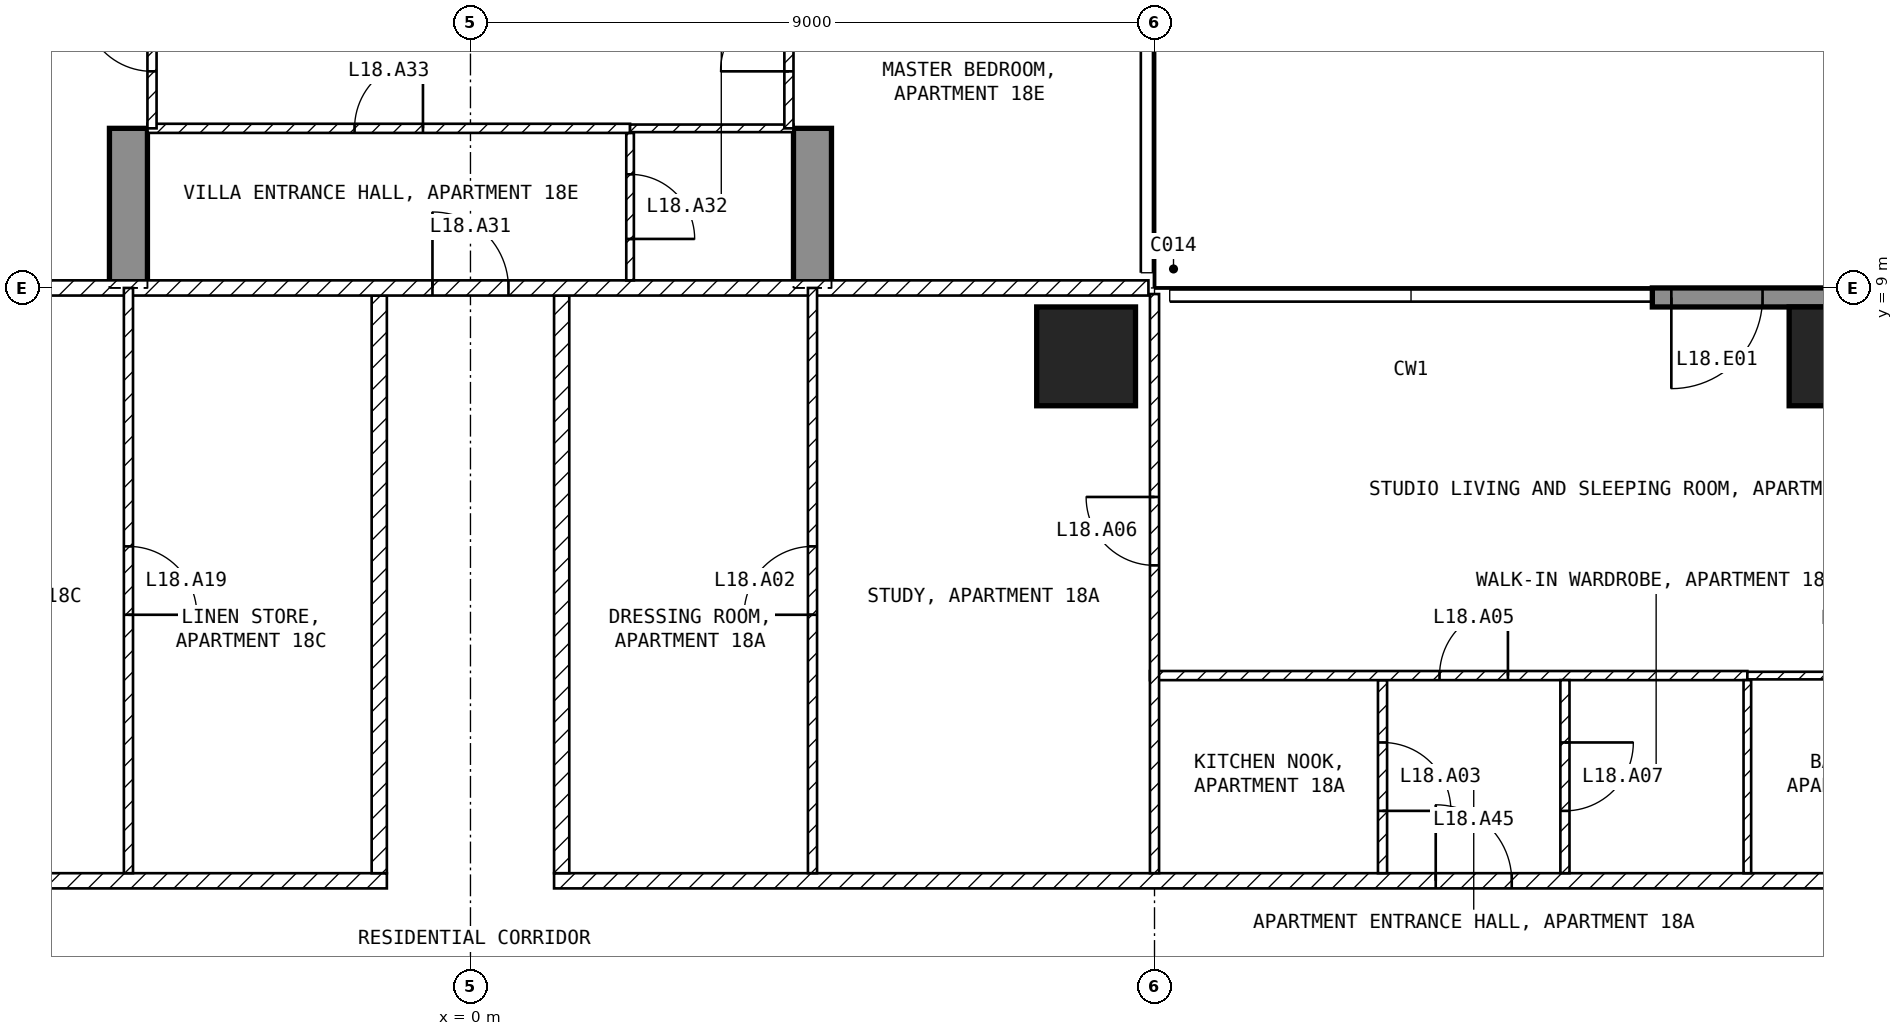
"""IFC4 building model, lengths in metres.
Left out: names, types, materials, properties, quantities, classifications, styles, units other than length and angle.
Written with IfcOpenShell. Run it as: python <this file> out.ifc"""

import sys

from ifc_helpers import new_model, si_unit, direction, frame, frame_2d, origin, origin_2d, place, context, subcontext, project, spatial, polyline, rectangle, outline, extrude, element, fill, save


model = new_model("IFC4")
c1 = context("Model", 3, precision=1e-05, world=origin(), true_north=direction((0.0, 1.0)))
c2 = subcontext(c1, "Body", "Model", "MODEL_VIEW")
j1 = project(units=[si_unit("LENGTHUNIT", "METRE"), si_unit("PLANEANGLEUNIT", "RADIAN")], contexts=[c1])
p1 = place(None, origin())
s1 = spatial("IfcSite", under=j1, at=p1, CompositionType="ELEMENT")
p2 = place(p1, origin())
s2 = spatial("IfcBuilding", under=s1, at=p2, CompositionType="ELEMENT")
p3 = place(p2, frame((0.0, 0.0, 82.0)))
s3 = spatial("IfcBuildingStorey", under=s2, at=p3, CompositionType="ELEMENT", Elevation=82.0)
for number, where, z_axis, x_axis in (
    (1, (8.1, 8.1, -0.25), (0.0, 0.0, 1.0), (1.0, 0.0, 0.0)),
    (2, (18.0, 8.1, -0.25), (0.0, 0.0, 1.0), (1.0, 0.0, 0.0)),
):
    element("IfcColumn", number, at=place(p3, frame(where, z_axis=z_axis, x_axis=x_axis)), inside=s3, PredefinedType="COLUMN", context=c2, shape_type="SweptSolid", body=[
        extrude(rectangle(XDim=1.3, YDim=1.3, at=origin_2d()), origin(), (0.0, 0.0, 1.0), 3.5),
    ])
for number, where, z_axis, x_axis in (
    (3, (-4.75, 9.0, -0.25), (1.0, 0.0, 0.0), (0.0, 1.0, 0.0)),
    (4, (4.25, 9.0, -0.25), (1.0, 0.0, 0.0), (0.0, 1.0, 0.0)),
):
    element("IfcWall", number, at=place(p3, frame(where, z_axis=z_axis, x_axis=x_axis)), inside=s3, PredefinedType="SHEAR", context=c2, shape_type="SweptSolid", body=[
        extrude(outline(polyline([(0.0, 0.0), (2.1, 0.0), (2.1, 2.65), (4.5, 2.65), (4.5, 0.0), (9.9, 0.0), (9.9, 2.65), (12.3, 2.65), (12.3, 0.0), (16.45, 0.0), (16.45, 3.5), (0.0, 3.5), (0.0, 0.0)])), origin(), (0.0, 0.0, 1.0), 0.5),
    ])
p4 = place(p3, frame((18.2, 8.875, 0.0), z_axis=(0.0, 0.0, 1.0), x_axis=(-1.0, 0.0, 0.0)))
e5 = element("IfcWall", 5, at=p4, inside=s3, PredefinedType="SOLIDWALL", context=c2, shape_type="SweptSolid", body=[
    extrude(rectangle(XDim=2.65, YDim=0.25, at=frame_2d((1.325, 0.0))), origin(), (0.0, 0.0, 1.0), 3.25),
])
p5 = place(p4, frame((1.2, 0.0, 0.0)))
e6 = element("IfcOpeningElement", 6, at=p5, cuts=e5, PredefinedType="OPENING", context=c2, shape_type="SweptSolid", body=[
    extrude(rectangle(XDim=1.2, YDim=2.4, at=frame_2d((0.6, 1.2))), frame((0.0, 0.135, 0.0), z_axis=(0.0, -1.0, 0.0), x_axis=(1.0, 0.0, 0.0)), (0.0, 0.0, 1.0), 0.27),
])
p6 = place(p3, frame((1.1, 1.2, 0.0), z_axis=(0.0, 0.0, 1.0), x_axis=(1.0, 0.0, 0.0)))
e7 = element("IfcWall", 7, at=p6, inside=s3, PredefinedType="PARTITIONING", context=c2, shape_type="SweptSolid", body=[
    extrude(rectangle(XDim=20.5, YDim=0.2, at=frame_2d((10.25, 0.0))), origin(), (0.0, 0.0, 1.0), 3.25),
])
p7 = place(p6, frame((11.6, 0.0, 0.0)))
e8 = element("IfcOpeningElement", 8, at=p7, cuts=e7, PredefinedType="OPENING", context=c2, shape_type="SweptSolid", body=[
    extrude(rectangle(XDim=1.0, YDim=2.1, at=frame_2d((0.5, 1.05))), frame((0.0, 0.11, 0.0), z_axis=(0.0, -1.0, 0.0), x_axis=(1.0, 0.0, 0.0)), (0.0, 0.0, 1.0), 0.22),
])
p8 = place(p3, frame((1.2, 8.9, 0.0), z_axis=(0.0, 0.0, 1.0), x_axis=(0.0, -1.0, 0.0)))
e9 = element("IfcWall", 9, at=p8, inside=s3, PredefinedType="PARTITIONING", context=c2, shape_type="SweptSolid", body=[
    extrude(rectangle(XDim=7.6, YDim=0.2, at=frame_2d((3.8, 0.0))), origin(), (0.0, 0.0, 1.0), 3.25),
])
p9 = place(p3, frame((-21.6, 1.2, 0.0), z_axis=(0.0, 0.0, 1.0), x_axis=(1.0, 0.0, 0.0)))
e10 = element("IfcWall", 10, at=p9, inside=s3, PredefinedType="PARTITIONING", context=c2, shape_type="SweptSolid", body=[
    extrude(rectangle(XDim=20.5, YDim=0.2, at=frame_2d((10.25, 0.0))), origin(), (0.0, 0.0, 1.0), 3.25),
])
p10 = place(p9, frame((4.75, 0.0, 0.0)))
e11 = element("IfcOpeningElement", 11, at=p10, cuts=e10, PredefinedType="OPENING", context=c2, shape_type="SweptSolid", body=[
    extrude(rectangle(XDim=1.0, YDim=2.1, at=frame_2d((0.5, 1.05))), frame((0.0, 0.11, 0.0), z_axis=(0.0, -1.0, 0.0), x_axis=(1.0, 0.0, 0.0)), (0.0, 0.0, 1.0), 0.22),
])
p11 = place(p3, frame((-1.2, 1.3, 0.0), z_axis=(0.0, 0.0, 1.0), x_axis=(0.0, 1.0, 0.0)))
e12 = element("IfcWall", 12, at=p11, inside=s3, PredefinedType="PARTITIONING", context=c2, shape_type="SweptSolid", body=[
    extrude(rectangle(XDim=7.6, YDim=0.2, at=frame_2d((3.8, 0.0))), origin(), (0.0, 0.0, 1.0), 3.25),
])
p12 = place(p3, frame((-8.92, 9.0, 0.0), z_axis=(0.0, 0.0, 1.0), x_axis=(1.0, 0.0, 0.0)))
e13 = element("IfcWall", 13, at=p12, inside=s3, PredefinedType="PARTITIONING", context=c2, shape_type="SweptSolid", body=[
    extrude(rectangle(XDim=17.84, YDim=0.2, at=frame_2d((8.92, 0.0))), origin(), (0.0, 0.0, 1.0), 3.25),
])
p13 = place(p12, frame((8.42, 0.0, 0.0)))
e14 = element("IfcOpeningElement", 14, at=p13, cuts=e13, PredefinedType="OPENING", context=c2, shape_type="SweptSolid", body=[
    extrude(rectangle(XDim=1.0, YDim=2.1, at=frame_2d((0.5, 1.05))), frame((0.0, 0.11, 0.0), z_axis=(0.0, -1.0, 0.0), x_axis=(1.0, 0.0, 0.0)), (0.0, 0.0, 1.0), 0.22),
])
p14 = place(p3, frame((12.0, 3.84, 0.0), z_axis=(0.0, 0.0, 1.0), x_axis=(0.0, -1.0, 0.0)))
e15 = element("IfcWall", 15, at=p14, inside=s3, PredefinedType="PARTITIONING", context=c2, shape_type="SweptSolid", body=[
    extrude(rectangle(XDim=2.54, YDim=0.12, at=frame_2d((1.27, 0.0))), origin(), (0.0, 0.0, 1.0), 3.25),
])
p15 = place(p14, frame((0.82, 0.0, 0.0)))
e16 = element("IfcOpeningElement", 16, at=p15, cuts=e15, PredefinedType="OPENING", context=c2, shape_type="SweptSolid", body=[
    extrude(rectangle(XDim=0.9, YDim=2.1, at=frame_2d((0.45, 1.05))), frame((0.0, 0.07, 0.0), z_axis=(0.0, -1.0, 0.0), x_axis=(1.0, 0.0, 0.0)), (0.0, 0.0, 1.0), 0.14),
])
p16 = place(p3, frame((8.94, 3.9, 0.0), z_axis=(0.0, 0.0, 1.0), x_axis=(1.0, 0.0, 0.0)))
e17 = element("IfcWall", 17, at=p16, inside=s3, PredefinedType="PARTITIONING", context=c2, shape_type="SweptSolid", body=[
    extrude(rectangle(XDim=7.86, YDim=0.12, at=frame_2d((3.93, 0.0))), origin(), (0.0, 0.0, 1.0), 3.25),
])
p17 = place(p16, frame((3.81, 0.0, 0.0)))
e18 = element("IfcOpeningElement", 18, at=p17, cuts=e17, PredefinedType="OPENING", context=c2, shape_type="SweptSolid", body=[
    extrude(rectangle(XDim=0.9, YDim=2.1, at=frame_2d((0.45, 1.05))), frame((0.0, 0.07, 0.0), z_axis=(0.0, -1.0, 0.0), x_axis=(1.0, 0.0, 0.0)), (0.0, 0.0, 1.0), 0.14),
])
p18 = place(p3, frame((9.0, 1.3, 0.0), z_axis=(0.0, 0.0, 1.0), x_axis=(0.0, 1.0, 0.0)))
e19 = element("IfcWall", 19, at=p18, inside=s3, PredefinedType="PARTITIONING", context=c2, shape_type="SweptSolid", body=[
    extrude(rectangle(XDim=7.62, YDim=0.12, at=frame_2d((3.81, 0.0))), origin(), (0.0, 0.0, 1.0), 3.25),
])
p19 = place(p18, frame((4.05, 0.0, 0.0)))
e20 = element("IfcOpeningElement", 20, at=p19, cuts=e19, PredefinedType="OPENING", context=c2, shape_type="SweptSolid", body=[
    extrude(rectangle(XDim=0.9, YDim=2.1, at=frame_2d((0.45, 1.05))), frame((0.0, 0.07, 0.0), z_axis=(0.0, -1.0, 0.0), x_axis=(1.0, 0.0, 0.0)), (0.0, 0.0, 1.0), 0.14),
])
p20 = place(p3, frame((14.4, 3.84, 0.0), z_axis=(0.0, 0.0, 1.0), x_axis=(0.0, -1.0, 0.0)))
e21 = element("IfcWall", 21, at=p20, inside=s3, PredefinedType="PARTITIONING", context=c2, shape_type="SweptSolid", body=[
    extrude(rectangle(XDim=2.54, YDim=0.12, at=frame_2d((1.27, 0.0))), origin(), (0.0, 0.0, 1.0), 3.25),
])
p21 = place(p20, frame((0.82, 0.0, 0.0)))
e22 = element("IfcOpeningElement", 22, at=p21, cuts=e21, PredefinedType="OPENING", context=c2, shape_type="SweptSolid", body=[
    extrude(rectangle(XDim=0.9, YDim=2.1, at=frame_2d((0.45, 1.05))), frame((0.0, 0.07, 0.0), z_axis=(0.0, -1.0, 0.0), x_axis=(1.0, 0.0, 0.0)), (0.0, 0.0, 1.0), 0.14),
])
p22 = place(p3, frame((16.8, 3.84, 0.0), z_axis=(0.0, 0.0, 1.0), x_axis=(0.0, -1.0, 0.0)))
e23 = element("IfcWall", 23, at=p22, inside=s3, PredefinedType="PARTITIONING", context=c2, shape_type="SweptSolid", body=[
    extrude(rectangle(XDim=2.54, YDim=0.1, at=frame_2d((1.27, 0.0))), origin(), (0.0, 0.0, 1.0), 3.25),
])
p23 = place(p3, frame((16.8, 3.9, 0.0), z_axis=(0.0, 0.0, 1.0), x_axis=(1.0, 0.0, 0.0)))
e24 = element("IfcWall", 24, at=p23, inside=s3, PredefinedType="PARTITIONING", context=c2, shape_type="SweptSolid", body=[
    extrude(rectangle(XDim=3.0, YDim=0.1, at=frame_2d((1.5, 0.0))), origin(), (0.0, 0.0, 1.0), 3.25),
])
p24 = place(p23, frame((1.075, 0.0, 0.0)))
e25 = element("IfcOpeningElement", 25, at=p24, cuts=e24, PredefinedType="OPENING", context=c2, shape_type="SweptSolid", body=[
    extrude(rectangle(XDim=0.85, YDim=2.1, at=frame_2d((0.425, 1.05))), frame((0.0, 0.06, 0.0), z_axis=(0.0, -1.0, 0.0), x_axis=(1.0, 0.0, 0.0)), (0.0, 0.0, 1.0), 0.12),
])
p25 = place(p3, frame((4.5, 1.3, 0.0), z_axis=(0.0, 0.0, 1.0), x_axis=(0.0, 1.0, 0.0)))
e26 = element("IfcWall", 26, at=p25, inside=s3, PredefinedType="PARTITIONING", context=c2, shape_type="SweptSolid", body=[
    extrude(rectangle(XDim=7.7, YDim=0.12, at=frame_2d((3.85, 0.0))), origin(), (0.0, 0.0, 1.0), 3.25),
])
p26 = place(p25, frame((3.4, 0.0, 0.0)))
e27 = element("IfcOpeningElement", 27, at=p26, cuts=e26, PredefinedType="OPENING", context=c2, shape_type="SweptSolid", body=[
    extrude(rectangle(XDim=0.9, YDim=2.1, at=frame_2d((0.45, 1.05))), frame((0.0, 0.07, 0.0), z_axis=(0.0, -1.0, 0.0), x_axis=(1.0, 0.0, 0.0)), (0.0, 0.0, 1.0), 0.14),
])
p27 = place(p3, frame((-4.5, 9.0, 0.0), z_axis=(0.0, 0.0, 1.0), x_axis=(0.0, -1.0, 0.0)))
e28 = element("IfcWall", 28, at=p27, inside=s3, PredefinedType="PARTITIONING", context=c2, shape_type="SweptSolid", body=[
    extrude(rectangle(XDim=7.7, YDim=0.12, at=frame_2d((3.85, 0.0))), origin(), (0.0, 0.0, 1.0), 3.25),
])
p28 = place(p27, frame((3.4, 0.0, 0.0)))
e29 = element("IfcOpeningElement", 29, at=p28, cuts=e28, PredefinedType="OPENING", context=c2, shape_type="SweptSolid", body=[
    extrude(rectangle(XDim=0.9, YDim=2.1, at=frame_2d((0.45, 1.05))), frame((0.0, 0.07, 0.0), z_axis=(0.0, -1.0, 0.0), x_axis=(1.0, 0.0, 0.0)), (0.0, 0.0, 1.0), 0.14),
])
p29 = place(p3, frame((2.1, 11.04, 0.0), z_axis=(0.0, 0.0, 1.0), x_axis=(0.0, -1.0, 0.0)))
e30 = element("IfcWall", 30, at=p29, inside=s3, PredefinedType="PARTITIONING", context=c2, shape_type="SweptSolid", body=[
    extrude(rectangle(XDim=1.94, YDim=0.1, at=frame_2d((0.97, 0.0))), origin(), (0.0, 0.0, 1.0), 3.25),
])
p30 = place(p29, frame((0.545, 0.0, 0.0)))
e31 = element("IfcOpeningElement", 31, at=p30, cuts=e30, PredefinedType="OPENING", context=c2, shape_type="SweptSolid", body=[
    extrude(rectangle(XDim=0.85, YDim=2.1, at=frame_2d((0.425, 1.05))), frame((0.0, 0.06, 0.0), z_axis=(0.0, -1.0, 0.0), x_axis=(1.0, 0.0, 0.0)), (0.0, 0.0, 1.0), 0.12),
])
p31 = place(p3, frame((-4.25, 11.1, 0.0), z_axis=(0.0, 0.0, 1.0), x_axis=(1.0, 0.0, 0.0)))
e32 = element("IfcWall", 32, at=p31, inside=s3, PredefinedType="PARTITIONING", context=c2, shape_type="SweptSolid", body=[
    extrude(rectangle(XDim=6.35, YDim=0.12, at=frame_2d((3.175, 0.0))), origin(), (0.0, 0.0, 1.0), 3.25),
])
p32 = place(p31, frame((2.725, 0.0, 0.0)))
e33 = element("IfcOpeningElement", 33, at=p32, cuts=e32, PredefinedType="OPENING", context=c2, shape_type="SweptSolid", body=[
    extrude(rectangle(XDim=0.9, YDim=2.1, at=frame_2d((0.45, 1.05))), frame((0.0, 0.07, 0.0), z_axis=(0.0, -1.0, 0.0), x_axis=(1.0, 0.0, 0.0)), (0.0, 0.0, 1.0), 0.14),
])
p33 = place(p3, frame((2.1, 11.1, 0.0), z_axis=(0.0, 0.0, 1.0), x_axis=(1.0, 0.0, 0.0)))
e34 = element("IfcWall", 34, at=p33, inside=s3, PredefinedType="PARTITIONING", context=c2, shape_type="SweptSolid", body=[
    extrude(rectangle(XDim=2.15, YDim=0.1, at=frame_2d((1.075, 0.0))), origin(), (0.0, 0.0, 1.0), 3.25),
])
p34 = place(p3, frame((4.19, 11.1, 0.0), z_axis=(0.0, 0.0, 1.0), x_axis=(0.0, 1.0, 0.0)))
e35 = element("IfcWall", 35, at=p34, inside=s3, PredefinedType="PARTITIONING", context=c2, shape_type="SweptSolid", body=[
    extrude(rectangle(XDim=2.4, YDim=0.12, at=frame_2d((1.2, 0.0))), origin(), (0.0, 0.0, 1.0), 2.4),
])
p35 = place(p34, frame((0.75, 0.0, 0.0)))
e36 = element("IfcOpeningElement", 36, at=p35, cuts=e35, PredefinedType="OPENING", context=c2, shape_type="SweptSolid", body=[
    extrude(rectangle(XDim=0.9, YDim=2.1, at=frame_2d((0.45, 1.05))), frame((0.0, 0.07, 0.0), z_axis=(0.0, -1.0, 0.0), x_axis=(1.0, 0.0, 0.0)), (0.0, 0.0, 1.0), 0.14),
])
p36 = place(p3, frame((-4.19, 11.1, 0.0), z_axis=(0.0, 0.0, 1.0), x_axis=(0.0, 1.0, 0.0)))
e37 = element("IfcWall", 37, at=p36, inside=s3, PredefinedType="PARTITIONING", context=c2, shape_type="SweptSolid", body=[
    extrude(rectangle(XDim=2.4, YDim=0.12, at=frame_2d((1.2, 0.0))), origin(), (0.0, 0.0, 1.0), 2.4),
])
p37 = place(p36, frame((0.75, 0.0, 0.0)))
e38 = element("IfcOpeningElement", 38, at=p37, cuts=e37, PredefinedType="OPENING", context=c2, shape_type="SweptSolid", body=[
    extrude(rectangle(XDim=0.9, YDim=2.1, at=frame_2d((0.45, 1.05))), frame((0.0, 0.07, 0.0), z_axis=(0.0, -1.0, 0.0), x_axis=(1.0, 0.0, 0.0)), (0.0, 0.0, 1.0), 0.14),
])
p38 = place(p5, origin())
e39 = element("IfcDoor", 39, at=p38, inside=s3, OperationType="SINGLE_SWING_RIGHT", PredefinedType="DOOR", context=c2, shape_type="SweptSolid", body=[
    extrude(rectangle(XDim=1.2, YDim=2.4, at=frame_2d((0.6, 1.2))), frame((0.0, 0.025, 0.0), z_axis=(0.0, -1.0, 0.0), x_axis=(1.0, 0.0, 0.0)), (0.0, 0.0, 1.0), 0.05),
])
fill(e6, e39)
p39 = place(p26, origin())
e40 = element("IfcDoor", 40, at=p39, inside=s3, OperationType="SINGLE_SWING_LEFT", PredefinedType="DOOR", context=c2, shape_type="SweptSolid", body=[
    extrude(rectangle(XDim=0.9, YDim=2.1, at=frame_2d((0.45, 1.05))), frame((0.0, 0.025, 0.0), z_axis=(0.0, -1.0, 0.0), x_axis=(1.0, 0.0, 0.0)), (0.0, 0.0, 1.0), 0.05),
])
fill(e27, e40)
p40 = place(p15, origin())
e41 = element("IfcDoor", 41, at=p40, inside=s3, OperationType="SINGLE_SWING_RIGHT", PredefinedType="DOOR", context=c2, shape_type="SweptSolid", body=[
    extrude(rectangle(XDim=0.9, YDim=2.1, at=frame_2d((0.45, 1.05))), frame((0.0, 0.025, 0.0), z_axis=(0.0, -1.0, 0.0), x_axis=(1.0, 0.0, 0.0)), (0.0, 0.0, 1.0), 0.05),
])
fill(e16, e41)
p41 = place(p17, origin())
e42 = element("IfcDoor", 42, at=p41, inside=s3, OperationType="SINGLE_SWING_RIGHT", PredefinedType="DOOR", context=c2, shape_type="SweptSolid", body=[
    extrude(rectangle(XDim=0.9, YDim=2.1, at=frame_2d((0.45, 1.05))), frame((0.0, 0.025, 0.0), z_axis=(0.0, -1.0, 0.0), x_axis=(1.0, 0.0, 0.0)), (0.0, 0.0, 1.0), 0.05),
])
fill(e18, e42)
p42 = place(p19, origin())
e43 = element("IfcDoor", 43, at=p42, inside=s3, OperationType="SINGLE_SWING_RIGHT", PredefinedType="DOOR", context=c2, shape_type="SweptSolid", body=[
    extrude(rectangle(XDim=0.9, YDim=2.1, at=frame_2d((0.45, 1.05))), frame((0.0, 0.025, 0.0), z_axis=(0.0, -1.0, 0.0), x_axis=(1.0, 0.0, 0.0)), (0.0, 0.0, 1.0), 0.05),
])
fill(e20, e43)
p43 = place(p21, origin())
e44 = element("IfcDoor", 44, at=p43, inside=s3, OperationType="SINGLE_SWING_LEFT", PredefinedType="DOOR", context=c2, shape_type="SweptSolid", body=[
    extrude(rectangle(XDim=0.9, YDim=2.1, at=frame_2d((0.45, 1.05))), frame((0.0, 0.025, 0.0), z_axis=(0.0, -1.0, 0.0), x_axis=(1.0, 0.0, 0.0)), (0.0, 0.0, 1.0), 0.05),
])
fill(e22, e44)
p44 = place(p28, origin())
e45 = element("IfcDoor", 45, at=p44, inside=s3, OperationType="SINGLE_SWING_RIGHT", PredefinedType="DOOR", context=c2, shape_type="SweptSolid", body=[
    extrude(rectangle(XDim=0.9, YDim=2.1, at=frame_2d((0.45, 1.05))), frame((0.0, 0.025, 0.0), z_axis=(0.0, -1.0, 0.0), x_axis=(1.0, 0.0, 0.0)), (0.0, 0.0, 1.0), 0.05),
])
fill(e29, e45)
p45 = place(p13, origin())
e46 = element("IfcDoor", 46, at=p45, inside=s3, OperationType="SINGLE_SWING_LEFT", PredefinedType="DOOR", context=c2, shape_type="SweptSolid", body=[
    extrude(rectangle(XDim=1.0, YDim=2.1, at=frame_2d((0.5, 1.05))), frame((0.0, 0.025, 0.0), z_axis=(0.0, -1.0, 0.0), x_axis=(1.0, 0.0, 0.0)), (0.0, 0.0, 1.0), 0.05),
])
fill(e14, e46)
p46 = place(p30, origin())
e47 = element("IfcDoor", 47, at=p46, inside=s3, OperationType="SINGLE_SWING_RIGHT", PredefinedType="DOOR", context=c2, shape_type="SweptSolid", body=[
    extrude(rectangle(XDim=0.85, YDim=2.1, at=frame_2d((0.425, 1.05))), frame((0.0, 0.025, 0.0), z_axis=(0.0, -1.0, 0.0), x_axis=(1.0, 0.0, 0.0)), (0.0, 0.0, 1.0), 0.05),
])
fill(e31, e47)
p47 = place(p32, origin())
e48 = element("IfcDoor", 48, at=p47, inside=s3, OperationType="SINGLE_SWING_RIGHT", PredefinedType="DOOR", context=c2, shape_type="SweptSolid", body=[
    extrude(rectangle(XDim=0.9, YDim=2.1, at=frame_2d((0.45, 1.05))), frame((0.0, 0.025, 0.0), z_axis=(0.0, -1.0, 0.0), x_axis=(1.0, 0.0, 0.0)), (0.0, 0.0, 1.0), 0.05),
])
fill(e33, e48)
p48 = place(p7, origin())
e49 = element("IfcDoor", 49, at=p48, inside=s3, OperationType="SINGLE_SWING_LEFT", PredefinedType="DOOR", context=c2, shape_type="SweptSolid", body=[
    extrude(rectangle(XDim=1.0, YDim=2.1, at=frame_2d((0.5, 1.05))), frame((0.0, 0.025, 0.0), z_axis=(0.0, -1.0, 0.0), x_axis=(1.0, 0.0, 0.0)), (0.0, 0.0, 1.0), 0.05),
])
fill(e8, e49)
p49 = place(p35, origin())
e50 = element("IfcDoor", 50, at=p49, inside=s3, OperationType="SINGLE_SWING_LEFT", PredefinedType="DOOR", context=c2, shape_type="SweptSolid", body=[
    extrude(rectangle(XDim=0.9, YDim=2.1, at=frame_2d((0.45, 1.05))), frame((0.0, 0.025, 0.0), z_axis=(0.0, -1.0, 0.0), x_axis=(1.0, 0.0, 0.0)), (0.0, 0.0, 1.0), 0.05),
])
fill(e36, e50)
p50 = place(p37, origin())
e51 = element("IfcDoor", 51, at=p50, inside=s3, OperationType="SINGLE_SWING_RIGHT", PredefinedType="DOOR", context=c2, shape_type="SweptSolid", body=[
    extrude(rectangle(XDim=0.9, YDim=2.1, at=frame_2d((0.45, 1.05))), frame((0.0, 0.025, 0.0), z_axis=(0.0, -1.0, 0.0), x_axis=(1.0, 0.0, 0.0)), (0.0, 0.0, 1.0), 0.05),
])
fill(e38, e51)
save(model, sys.argv[1])
